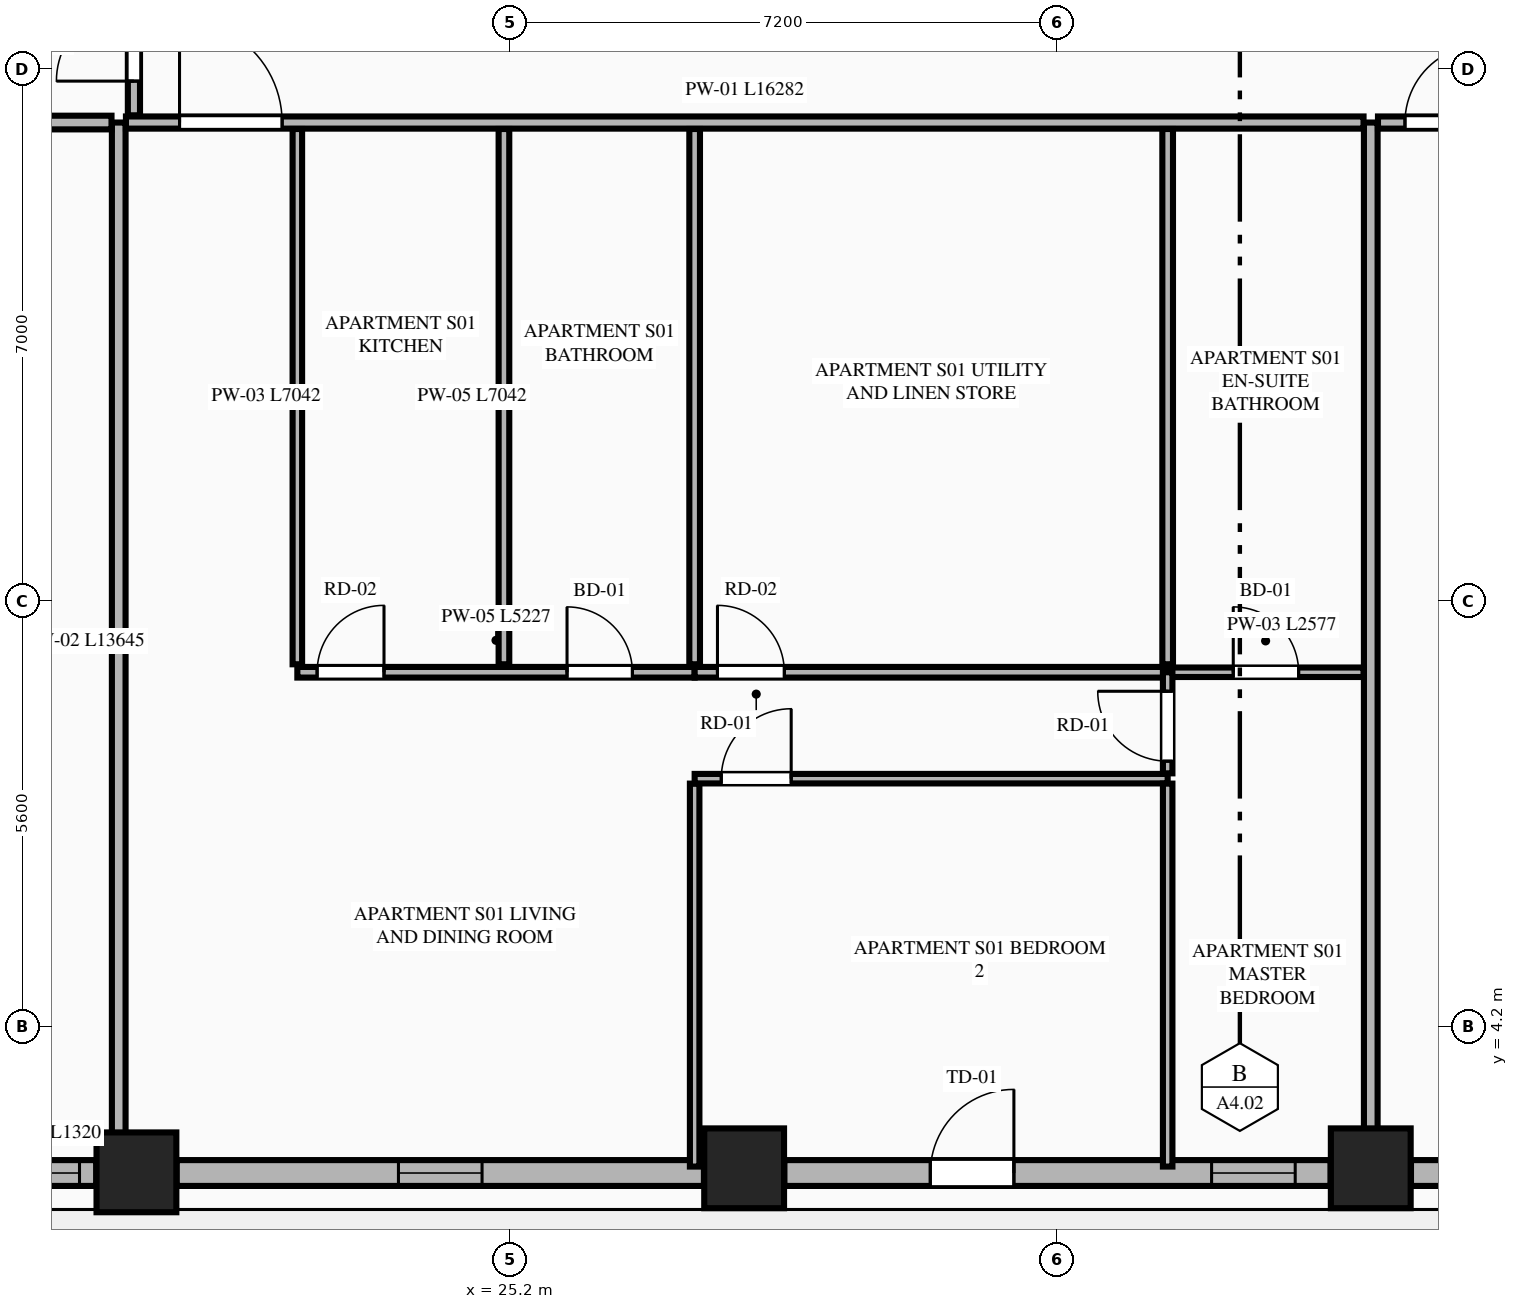
"""IFC4 building model, lengths in metres.
Left out: names, types, materials, properties, quantities, classifications, styles, units other than length and angle.
Written with IfcOpenShell. Run it as: python <this file> out.ifc"""

import sys

from ifc_helpers import new_model, si_unit, direction, frame, frame_2d, origin, origin_2d, place, context, subcontext, project, spatial, rectangle, extrude, element, fill, save


model = new_model("IFC4")
c1 = context("Model", 3, precision=1e-05, world=origin(), true_north=direction((0.0, 1.0)))
c2 = subcontext(c1, "Body", "Model", "MODEL_VIEW")
j1 = project(units=[si_unit("LENGTHUNIT", "METRE"), si_unit("PLANEANGLEUNIT", "RADIAN")], contexts=[c1])
p1 = place(None, origin())
s1 = spatial("IfcSite", under=j1, at=p1, CompositionType="ELEMENT")
p2 = place(p1, origin())
s2 = spatial("IfcBuilding", under=s1, at=p2, CompositionType="ELEMENT")
p3 = place(p2, frame((0.0, 0.0, 90.65)))
s3 = spatial("IfcBuildingStorey", under=s2, at=p3, CompositionType="ELEMENT", Elevation=90.65)
for number, where, z_axis, x_axis in (
    (1, (20.283, 2.289, 0.0), (0.0, 0.0, 1.0), (1.0, 0.0, 0.0)),
    (2, (28.278, 2.342, 0.0), (0.0, 0.0, 1.0), (1.0, 0.0, 0.0)),
    (3, (36.522, 2.342, 0.0), (0.0, 0.0, 1.0), (1.0, 0.0, 0.0)),
):
    element("IfcColumn", number, at=place(p3, frame(where, z_axis=z_axis, x_axis=x_axis)), inside=s3, PredefinedType="COLUMN", context=c2, shape_type="SweptSolid", body=[
        extrude(rectangle(XDim=1.05, YDim=1.05, at=origin_2d()), origin(), (0.0, 0.0, 1.0), 3.55),
    ])
p4 = place(p3, frame((18.434, 2.28, 0.0), z_axis=(0.0, 0.0, 1.0), x_axis=(1.0, 0.0, 0.0)))
e4 = element("IfcWall", 4, at=p4, inside=s3, PredefinedType="STANDARD", context=c2, shape_type="SweptSolid", body=[
    extrude(rectangle(XDim=1.32, YDim=0.34, at=frame_2d((0.66, 0.0))), origin(), (0.0, 0.0, 1.0), 3.33),
])
p5 = place(p4, frame((0.22, 0.0, 0.75)))
e5 = element("IfcOpeningElement", 5, at=p5, cuts=e4, PredefinedType="OPENING", context=c2, shape_type="SweptSolid", body=[
    extrude(rectangle(XDim=0.88, YDim=2.0, at=frame_2d((0.44, 1.0))), frame((0.0, 0.18, 0.0), z_axis=(0.0, -1.0, 0.0), x_axis=(1.0, 0.0, 0.0)), (0.0, 0.0, 1.0), 0.36),
])
p6 = place(p3, frame((20.812, 2.28, 0.0), z_axis=(0.0, 0.0, 1.0), x_axis=(1.0, 0.0, 0.0)))
e6 = element("IfcWall", 6, at=p6, inside=s3, PredefinedType="STANDARD", context=c2, shape_type="SweptSolid", body=[
    extrude(rectangle(XDim=6.937, YDim=0.34, at=frame_2d((3.469, 0.0))), origin(), (0.0, 0.0, 1.0), 2.712),
])
p7 = place(p6, frame((2.918, 0.0, 0.75)))
e7 = element("IfcOpeningElement", 7, at=p7, cuts=e6, PredefinedType="OPENING", context=c2, shape_type="SweptSolid", body=[
    extrude(rectangle(XDim=1.1, YDim=1.812, at=frame_2d((0.55, 0.906))), frame((0.0, 0.18, 0.0), z_axis=(0.0, -1.0, 0.0), x_axis=(1.0, 0.0, 0.0)), (0.0, 0.0, 1.0), 0.36),
])
p8 = place(p3, frame((28.807, 2.28, 0.0), z_axis=(0.0, 0.0, 1.0), x_axis=(1.0, 0.0, 0.0)))
e8 = element("IfcWall", 8, at=p8, inside=s3, PredefinedType="STANDARD", context=c2, shape_type="SweptSolid", body=[
    extrude(rectangle(XDim=7.186, YDim=0.34, at=frame_2d((3.593, 0.0))), origin(), (0.0, 0.0, 1.0), 2.712),
])
p9 = place(p8, frame((1.92, 0.0, 0.0)))
e9 = element("IfcOpeningElement", 9, at=p9, cuts=e8, PredefinedType="OPENING", context=c2, shape_type="SweptSolid", body=[
    extrude(rectangle(XDim=1.1, YDim=2.25, at=frame_2d((0.55, 1.125))), frame((0.0, 0.18, 0.0), z_axis=(0.0, -1.0, 0.0), x_axis=(1.0, 0.0, 0.0)), (0.0, 0.0, 1.0), 0.36),
])
p10 = place(p8, frame((5.621, 0.0, 0.75)))
e10 = element("IfcOpeningElement", 10, at=p10, cuts=e8, PredefinedType="OPENING", context=c2, shape_type="SweptSolid", body=[
    extrude(rectangle(XDim=1.1, YDim=1.812, at=frame_2d((0.55, 0.906))), frame((0.0, 0.18, 0.0), z_axis=(0.0, -1.0, 0.0), x_axis=(1.0, 0.0, 0.0)), (0.0, 0.0, 1.0), 0.36),
])
p11 = place(p3, frame((37.051, 2.28, 0.0), z_axis=(0.0, 0.0, 1.0), x_axis=(1.0, 0.0, 0.0)))
e11 = element("IfcWall", 11, at=p11, inside=s3, PredefinedType="STANDARD", context=c2, shape_type="SweptSolid", body=[
    extrude(rectangle(XDim=6.937, YDim=0.34, at=frame_2d((3.469, 0.0))), origin(), (0.0, 0.0, 1.0), 2.712),
])
p12 = place(p11, frame((2.918, 0.0, 0.75)))
e12 = element("IfcOpeningElement", 12, at=p12, cuts=e11, PredefinedType="OPENING", context=c2, shape_type="SweptSolid", body=[
    extrude(rectangle(XDim=1.1, YDim=1.812, at=frame_2d((0.55, 0.906))), frame((0.0, 0.18, 0.0), z_axis=(0.0, -1.0, 0.0), x_axis=(1.0, 0.0, 0.0)), (0.0, 0.0, 1.0), 0.36),
])
p13 = place(p3, frame((20.05, 2.455, 0.0), z_axis=(0.0, 0.0, 1.0), x_axis=(0.0, 1.0, 0.0)))
e13 = element("IfcWall", 13, at=p13, inside=s3, PredefinedType="PARTITIONING", context=c2, shape_type="SweptSolid", body=[
    extrude(rectangle(XDim=13.645, YDim=0.18, at=frame_2d((6.823, 0.0))), origin(), (0.0, 0.0, 1.0), 3.33),
])
p14 = place(p3, frame((36.522, 2.455, 0.0), z_axis=(0.0, 0.0, 1.0), x_axis=(0.0, 1.0, 0.0)))
e14 = element("IfcWall", 14, at=p14, inside=s3, PredefinedType="PARTITIONING", context=c2, shape_type="SweptSolid", body=[
    extrude(rectangle(XDim=13.645, YDim=0.18, at=frame_2d((6.823, 0.0))), origin(), (0.0, 0.0, 1.0), 2.637),
])
p15 = place(p3, frame((20.145, 16.1, 0.0), z_axis=(0.0, 0.0, 1.0), x_axis=(1.0, 0.0, 0.0)))
e15 = element("IfcWall", 15, at=p15, inside=s3, PredefinedType="PARTITIONING", context=c2, shape_type="SweptSolid", body=[
    extrude(rectangle(XDim=16.282, YDim=0.16, at=frame_2d((8.141, 0.0))), origin(), (0.0, 0.0, 1.0), 3.33),
])
p16 = place(p15, frame((0.705, 0.0, 0.0)))
e16 = element("IfcOpeningElement", 16, at=p16, cuts=e15, PredefinedType="OPENING", context=c2, shape_type="SweptSolid", body=[
    extrude(rectangle(XDim=1.35, YDim=2.35, at=frame_2d((0.675, 1.175))), frame((0.0, 0.09, 0.0), z_axis=(0.0, -1.0, 0.0), x_axis=(1.0, 0.0, 0.0)), (0.0, 0.0, 1.0), 0.18),
])
p17 = place(p3, frame((22.4, 8.973, 0.0), z_axis=(0.0, 0.0, 1.0), x_axis=(0.0, 1.0, 0.0)))
e17 = element("IfcWall", 17, at=p17, inside=s3, PredefinedType="PARTITIONING", context=c2, shape_type="SweptSolid", body=[
    extrude(rectangle(XDim=7.042, YDim=0.125, at=frame_2d((3.521, 0.0))), origin(), (0.0, 0.0, 1.0), 2.637),
])
p18 = place(p3, frame((22.4, 8.868, 0.0), z_axis=(0.0, 0.0, 1.0), x_axis=(1.0, 0.0, 0.0)))
e18 = element("IfcWall", 18, at=p18, inside=s3, PredefinedType="PLUMBINGWALL", context=c2, shape_type="SweptSolid", body=[
    extrude(rectangle(XDim=5.227, YDim=0.14, at=frame_2d((2.614, 0.0))), origin(), (0.0, 0.0, 1.0), 3.33),
])
p19 = place(p18, frame((3.548, 0.0, 0.0)))
e19 = element("IfcOpeningElement", 19, at=p19, cuts=e18, PredefinedType="OPENING", context=c2, shape_type="SweptSolid", body=[
    extrude(rectangle(XDim=0.86, YDim=2.1, at=frame_2d((0.43, 1.05))), frame((0.0, 0.08, 0.0), z_axis=(0.0, -1.0, 0.0), x_axis=(1.0, 0.0, 0.0)), (0.0, 0.0, 1.0), 0.16),
])
p20 = place(p18, frame((0.26, 0.0, 0.0)))
e20 = element("IfcOpeningElement", 20, at=p20, cuts=e18, PredefinedType="OPENING", context=c2, shape_type="SweptSolid", body=[
    extrude(rectangle(XDim=0.88, YDim=2.15, at=frame_2d((0.44, 1.075))), frame((0.0, 0.08, 0.0), z_axis=(0.0, -1.0, 0.0), x_axis=(1.0, 0.0, 0.0)), (0.0, 0.0, 1.0), 0.16),
])
p21 = place(p3, frame((27.627, 8.868, 0.0), z_axis=(0.0, 0.0, 1.0), x_axis=(1.0, 0.0, 0.0)))
e21 = element("IfcWall", 21, at=p21, inside=s3, PredefinedType="PLUMBINGWALL", context=c2, shape_type="SweptSolid", body=[
    extrude(rectangle(XDim=6.223, YDim=0.14, at=frame_2d((3.112, 0.0))), origin(), (0.0, 0.0, 1.0), 3.33),
])
p22 = place(p21, frame((0.3, 0.0, 0.0)))
e22 = element("IfcOpeningElement", 22, at=p22, cuts=e21, PredefinedType="OPENING", context=c2, shape_type="SweptSolid", body=[
    extrude(rectangle(XDim=0.88, YDim=2.15, at=frame_2d((0.44, 1.075))), frame((0.0, 0.08, 0.0), z_axis=(0.0, -1.0, 0.0), x_axis=(1.0, 0.0, 0.0)), (0.0, 0.0, 1.0), 0.16),
])
p23 = place(p3, frame((33.85, 8.868, 0.0), z_axis=(0.0, 0.0, 1.0), x_axis=(1.0, 0.0, 0.0)))
e23 = element("IfcWall", 23, at=p23, inside=s3, PredefinedType="PARTITIONING", context=c2, shape_type="SweptSolid", body=[
    extrude(rectangle(XDim=2.577, YDim=0.125, at=frame_2d((1.289, 0.0))), origin(), (0.0, 0.0, 1.0), 3.33),
])
p24 = place(p23, frame((0.863, 0.0, 0.0)))
e24 = element("IfcOpeningElement", 24, at=p24, cuts=e23, PredefinedType="OPENING", context=c2, shape_type="SweptSolid", body=[
    extrude(rectangle(XDim=0.86, YDim=2.1, at=frame_2d((0.43, 1.05))), frame((0.0, 0.073, 0.0), z_axis=(0.0, -1.0, 0.0), x_axis=(1.0, 0.0, 0.0)), (0.0, 0.0, 1.0), 0.145),
])
p25 = place(p3, frame((25.118, 8.973, 0.0), z_axis=(0.0, 0.0, 1.0), x_axis=(0.0, 1.0, 0.0)))
e25 = element("IfcWall", 25, at=p25, inside=s3, PredefinedType="PLUMBINGWALL", context=c2, shape_type="SweptSolid", body=[
    extrude(rectangle(XDim=7.042, YDim=0.14, at=frame_2d((3.521, 0.0))), origin(), (0.0, 0.0, 1.0), 3.33),
])
p26 = place(p3, frame((27.627, 2.365, 0.0), z_axis=(0.0, 0.0, 1.0), x_axis=(0.0, 1.0, 0.0)))
e26 = element("IfcWall", 26, at=p26, inside=s3, PredefinedType="PARTITIONING", context=c2, shape_type="SweptSolid", body=[
    extrude(rectangle(XDim=5.038, YDim=0.125, at=frame_2d((2.519, 0.0))), origin(), (0.0, 0.0, 1.0), 3.33),
])
p27 = place(p3, frame((27.627, 7.468, 0.0), z_axis=(0.0, 0.0, 1.0), x_axis=(1.0, 0.0, 0.0)))
e27 = element("IfcWall", 27, at=p27, inside=s3, PredefinedType="PARTITIONING", context=c2, shape_type="SweptSolid", body=[
    extrude(rectangle(XDim=6.223, YDim=0.125, at=frame_2d((3.112, 0.0))), origin(), (0.0, 0.0, 1.0), 3.33),
])
p28 = place(p27, frame((0.35, 0.0, 0.0)))
e28 = element("IfcOpeningElement", 28, at=p28, cuts=e27, PredefinedType="OPENING", context=c2, shape_type="SweptSolid", body=[
    extrude(rectangle(XDim=0.92, YDim=2.15, at=frame_2d((0.46, 1.075))), frame((0.0, 0.073, 0.0), z_axis=(0.0, -1.0, 0.0), x_axis=(1.0, 0.0, 0.0)), (0.0, 0.0, 1.0), 0.145),
])
p29 = place(p3, frame((33.85, 7.538, 0.0), z_axis=(0.0, 0.0, 1.0), x_axis=(0.0, 1.0, 0.0)))
e29 = element("IfcWall", 29, at=p29, inside=s3, PredefinedType="PARTITIONING", context=c2, shape_type="SweptSolid", body=[
    extrude(rectangle(XDim=1.33, YDim=0.125, at=frame_2d((0.665, 0.0))), origin(), (0.0, 0.0, 1.0), 3.33),
])
p30 = place(p29, frame((0.16, 0.0, 0.0)))
e30 = element("IfcOpeningElement", 30, at=p30, cuts=e29, PredefinedType="OPENING", context=c2, shape_type="SweptSolid", body=[
    extrude(rectangle(XDim=0.92, YDim=2.15, at=frame_2d((0.46, 1.075))), frame((0.0, 0.073, 0.0), z_axis=(0.0, -1.0, 0.0), x_axis=(1.0, 0.0, 0.0)), (0.0, 0.0, 1.0), 0.145),
])
for number, where, z_axis, x_axis in (
    (31, (27.627, 8.973, 0.0), (0.0, 0.0, 1.0), (0.0, 1.0, 0.0)),
    (32, (33.85, 8.973, 0.0), (0.0, 0.0, 1.0), (0.0, 1.0, 0.0)),
):
    element("IfcWall", number, at=place(p3, frame(where, z_axis=z_axis, x_axis=x_axis)), inside=s3, PredefinedType="PLUMBINGWALL", context=c2, shape_type="SweptSolid", body=[
        extrude(rectangle(XDim=7.042, YDim=0.14, at=frame_2d((3.521, 0.0))), origin(), (0.0, 0.0, 1.0), 3.33),
    ])
p31 = place(p3, frame((33.85, 2.365, 0.0), z_axis=(0.0, 0.0, 1.0), x_axis=(0.0, 1.0, 0.0)))
e33 = element("IfcWall", 33, at=p31, inside=s3, PredefinedType="PARTITIONING", context=c2, shape_type="SweptSolid", body=[
    extrude(rectangle(XDim=5.038, YDim=0.125, at=frame_2d((2.519, 0.0))), origin(), (0.0, 0.0, 1.0), 3.33),
])
p32 = place(p3, frame((36.617, 16.1, 0.0), z_axis=(0.0, 0.0, 1.0), x_axis=(1.0, 0.0, 0.0)))
e34 = element("IfcWall", 34, at=p32, inside=s3, PredefinedType="PARTITIONING", context=c2, shape_type="SweptSolid", body=[
    extrude(rectangle(XDim=8.038, YDim=0.16, at=frame_2d((4.019, 0.0))), origin(), (0.0, 0.0, 1.0), 3.33),
])
p33 = place(p32, frame((0.355, 0.0, 0.0)))
e35 = element("IfcOpeningElement", 35, at=p33, cuts=e34, PredefinedType="OPENING", context=c2, shape_type="SweptSolid", body=[
    extrude(rectangle(XDim=1.02, YDim=2.25, at=frame_2d((0.51, 1.125))), frame((0.0, 0.09, 0.0), z_axis=(0.0, -1.0, 0.0), x_axis=(1.0, 0.0, 0.0)), (0.0, 0.0, 1.0), 0.18),
])
p34 = place(p3, frame((10.488, 16.1, 0.0), z_axis=(0.0, 0.0, 1.0), x_axis=(1.0, 0.0, 0.0)))
e36 = element("IfcWall", 36, at=p34, inside=s3, PredefinedType="PARTITIONING", context=c2, shape_type="SweptSolid", body=[
    extrude(rectangle(XDim=9.467, YDim=0.18, at=frame_2d((4.733, 0.0))), origin(), (0.0, 0.0, 1.0), 3.33),
])
p35 = place(p3, frame((20.25, 16.195, 0.0), z_axis=(0.0, 0.0, 1.0), x_axis=(0.0, 1.0, 0.0)))
e37 = element("IfcWall", 37, at=p35, inside=s3, PredefinedType="PARTITIONING", context=c2, shape_type="SweptSolid", body=[
    extrude(rectangle(XDim=9.218, YDim=0.16, at=frame_2d((4.609, 0.0))), origin(), (0.0, 0.0, 1.0), 2.637),
])
p36 = place(p35, frame((0.45, 0.0, 0.0)))
e38 = element("IfcOpeningElement", 38, at=p36, cuts=e37, PredefinedType="OPENING", context=c2, shape_type="SweptSolid", body=[
    extrude(rectangle(XDim=1.02, YDim=2.25, at=frame_2d((0.51, 1.125))), frame((0.0, 0.09, 0.0), z_axis=(0.0, -1.0, 0.0), x_axis=(1.0, 0.0, 0.0)), (0.0, 0.0, 1.0), 0.18),
])
p37 = place(p7, origin())
e39 = element("IfcWindow", 39, at=p37, inside=s3, PartitioningType="SINGLE_PANEL", PredefinedType="WINDOW", context=c2, shape_type="SweptSolid", body=[
    extrude(rectangle(XDim=1.1, YDim=1.812, at=frame_2d((0.55, 0.906))), frame((0.0, 0.03, 0.0), z_axis=(0.0, -1.0, 0.0), x_axis=(1.0, 0.0, 0.0)), (0.0, 0.0, 1.0), 0.06),
])
fill(e7, e39)
p38 = place(p9, origin())
e40 = element("IfcDoor", 40, at=p38, inside=s3, OperationType="SINGLE_SWING_RIGHT", PredefinedType="DOOR", context=c2, shape_type="SweptSolid", body=[
    extrude(rectangle(XDim=1.1, YDim=2.25, at=frame_2d((0.55, 1.125))), frame((0.0, 0.025, 0.0), z_axis=(0.0, -1.0, 0.0), x_axis=(1.0, 0.0, 0.0)), (0.0, 0.0, 1.0), 0.05),
])
fill(e9, e40)
p39 = place(p19, origin())
e41 = element("IfcDoor", 41, at=p39, inside=s3, OperationType="SINGLE_SWING_LEFT", PredefinedType="DOOR", context=c2, shape_type="SweptSolid", body=[
    extrude(rectangle(XDim=0.86, YDim=2.1, at=frame_2d((0.43, 1.05))), frame((0.0, 0.025, 0.0), z_axis=(0.0, -1.0, 0.0), x_axis=(1.0, 0.0, 0.0)), (0.0, 0.0, 1.0), 0.05),
])
fill(e19, e41)
p40 = place(p24, origin())
e42 = element("IfcDoor", 42, at=p40, inside=s3, OperationType="SINGLE_SWING_LEFT", PredefinedType="DOOR", context=c2, shape_type="SweptSolid", body=[
    extrude(rectangle(XDim=0.86, YDim=2.1, at=frame_2d((0.43, 1.05))), frame((0.0, 0.025, 0.0), z_axis=(0.0, -1.0, 0.0), x_axis=(1.0, 0.0, 0.0)), (0.0, 0.0, 1.0), 0.05),
])
fill(e24, e42)
p41 = place(p16, origin())
e43 = element("IfcDoor", 43, at=p41, inside=s3, OperationType="SINGLE_SWING_LEFT", PredefinedType="DOOR", context=c2, shape_type="SweptSolid", body=[
    extrude(rectangle(XDim=1.35, YDim=2.35, at=frame_2d((0.675, 1.175))), frame((0.0, 0.025, 0.0), z_axis=(0.0, -1.0, 0.0), x_axis=(1.0, 0.0, 0.0)), (0.0, 0.0, 1.0), 0.05),
])
fill(e16, e43)
p42 = place(p20, origin())
e44 = element("IfcDoor", 44, at=p42, inside=s3, OperationType="SINGLE_SWING_RIGHT", PredefinedType="DOOR", context=c2, shape_type="SweptSolid", body=[
    extrude(rectangle(XDim=0.88, YDim=2.15, at=frame_2d((0.44, 1.075))), frame((0.0, 0.025, 0.0), z_axis=(0.0, -1.0, 0.0), x_axis=(1.0, 0.0, 0.0)), (0.0, 0.0, 1.0), 0.05),
])
fill(e20, e44)
p43 = place(p22, origin())
e45 = element("IfcDoor", 45, at=p43, inside=s3, OperationType="SINGLE_SWING_LEFT", PredefinedType="DOOR", context=c2, shape_type="SweptSolid", body=[
    extrude(rectangle(XDim=0.88, YDim=2.15, at=frame_2d((0.44, 1.075))), frame((0.0, 0.025, 0.0), z_axis=(0.0, -1.0, 0.0), x_axis=(1.0, 0.0, 0.0)), (0.0, 0.0, 1.0), 0.05),
])
fill(e22, e45)
p44 = place(p28, origin())
e46 = element("IfcDoor", 46, at=p44, inside=s3, OperationType="SINGLE_SWING_RIGHT", PredefinedType="DOOR", context=c2, shape_type="SweptSolid", body=[
    extrude(rectangle(XDim=0.92, YDim=2.15, at=frame_2d((0.46, 1.075))), frame((0.0, 0.025, 0.0), z_axis=(0.0, -1.0, 0.0), x_axis=(1.0, 0.0, 0.0)), (0.0, 0.0, 1.0), 0.05),
])
fill(e28, e46)
p45 = place(p30, origin())
e47 = element("IfcDoor", 47, at=p45, inside=s3, OperationType="SINGLE_SWING_RIGHT", PredefinedType="DOOR", context=c2, shape_type="SweptSolid", body=[
    extrude(rectangle(XDim=0.92, YDim=2.15, at=frame_2d((0.46, 1.075))), frame((0.0, 0.025, 0.0), z_axis=(0.0, -1.0, 0.0), x_axis=(1.0, 0.0, 0.0)), (0.0, 0.0, 1.0), 0.05),
])
fill(e30, e47)
p46 = place(p33, origin())
e48 = element("IfcDoor", 48, at=p46, inside=s3, OperationType="SINGLE_SWING_RIGHT", PredefinedType="DOOR", context=c2, shape_type="SweptSolid", body=[
    extrude(rectangle(XDim=1.02, YDim=2.25, at=frame_2d((0.51, 1.125))), frame((0.0, 0.025, 0.0), z_axis=(0.0, -1.0, 0.0), x_axis=(1.0, 0.0, 0.0)), (0.0, 0.0, 1.0), 0.05),
])
fill(e35, e48)
p47 = place(p36, origin())
e49 = element("IfcDoor", 49, at=p47, inside=s3, OperationType="SINGLE_SWING_LEFT", PredefinedType="DOOR", context=c2, shape_type="SweptSolid", body=[
    extrude(rectangle(XDim=1.02, YDim=2.25, at=frame_2d((0.51, 1.125))), frame((0.0, 0.025, 0.0), z_axis=(0.0, -1.0, 0.0), x_axis=(1.0, 0.0, 0.0)), (0.0, 0.0, 1.0), 0.05),
])
fill(e38, e49)
p48 = place(p5, origin())
e50 = element("IfcWindow", 50, at=p48, inside=s3, PartitioningType="SINGLE_PANEL", PredefinedType="WINDOW", context=c2, shape_type="SweptSolid", body=[
    extrude(rectangle(XDim=0.88, YDim=2.0, at=frame_2d((0.44, 1.0))), frame((0.0, 0.03, 0.0), z_axis=(0.0, -1.0, 0.0), x_axis=(1.0, 0.0, 0.0)), (0.0, 0.0, 1.0), 0.06),
])
fill(e5, e50)
p49 = place(p10, origin())
e51 = element("IfcWindow", 51, at=p49, inside=s3, PartitioningType="SINGLE_PANEL", PredefinedType="WINDOW", context=c2, shape_type="SweptSolid", body=[
    extrude(rectangle(XDim=1.1, YDim=1.812, at=frame_2d((0.55, 0.906))), frame((0.0, 0.03, 0.0), z_axis=(0.0, -1.0, 0.0), x_axis=(1.0, 0.0, 0.0)), (0.0, 0.0, 1.0), 0.06),
])
fill(e10, e51)
save(model, sys.argv[1])
